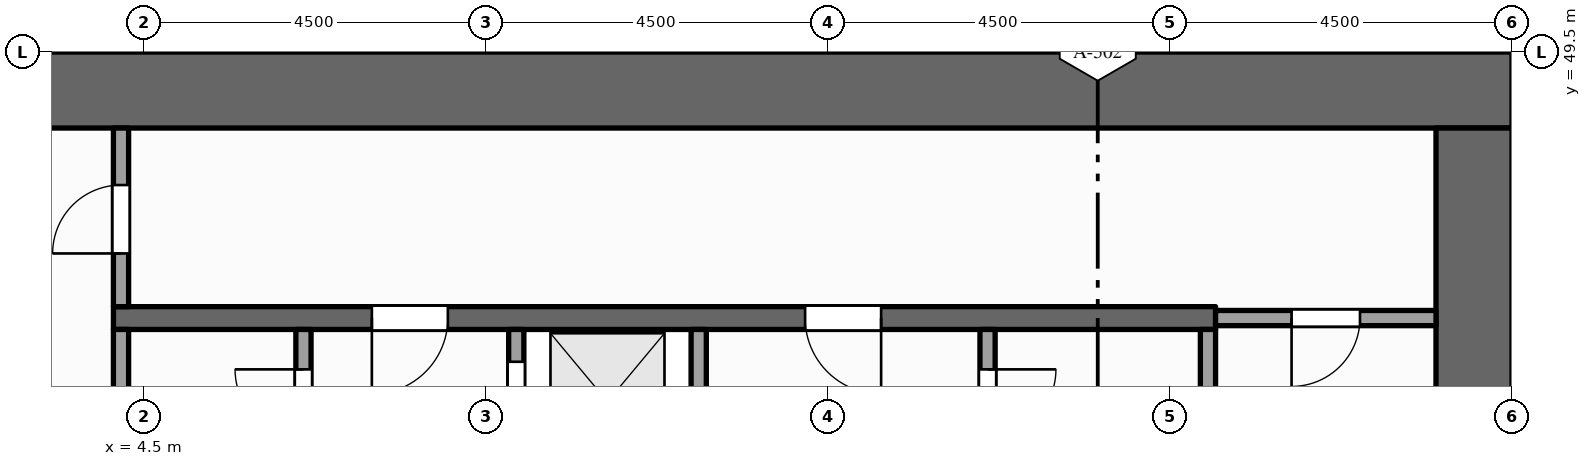
"""IFC4 building model, lengths in metres.
Left out: names, types, materials, properties, quantities, classifications, styles, units other than length and angle.
Written with IfcOpenShell. Run it as: python <this file> out.ifc"""

import sys

from ifc_helpers import new_model, si_unit, direction, frame, frame_2d, origin, place, context, subcontext, project, spatial, rectangle, extrude, element, fill, save


model = new_model("IFC4")
c1 = context("Model", 3, precision=1e-05, world=origin(), true_north=direction((0.0, 1.0)))
c2 = subcontext(c1, "Body", "Model", "MODEL_VIEW")
j1 = project(units=[si_unit("LENGTHUNIT", "METRE"), si_unit("PLANEANGLEUNIT", "RADIAN")], contexts=[c1])
p1 = place(None, origin())
s1 = spatial("IfcSite", under=j1, at=p1, CompositionType="ELEMENT")
p2 = place(p1, origin())
s2 = spatial("IfcBuilding", under=s1, at=p2, CompositionType="ELEMENT")
p3 = place(p2, frame((0.0, 0.0, 235.0)))
s3 = spatial("IfcBuildingStorey", under=s2, at=p3, CompositionType="ELEMENT", Elevation=235.0)
p4 = place(p3, frame((0.0, 49.0, -0.15), z_axis=(0.0, 0.0, 1.0), x_axis=(1.0, 0.0, 0.0)))
e1 = element("IfcWall", 1, at=p4, inside=s3, PredefinedType="SHEAR", context=c2, shape_type="SweptSolid", body=[
    extrude(rectangle(XDim=22.5, YDim=1.0, at=frame_2d((11.25, 0.0))), origin(), (0.0, 0.0, 1.0), 4.0),
])
p5 = place(p3, frame((22.0, 37.0, -0.15), z_axis=(0.0, 0.0, 1.0), x_axis=(0.0, 1.0, 0.0)))
e2 = element("IfcWall", 2, at=p5, inside=s3, PredefinedType="SHEAR", context=c2, shape_type="SweptSolid", body=[
    extrude(rectangle(XDim=11.5, YDim=1.0, at=frame_2d((5.75, 0.0))), origin(), (0.0, 0.0, 1.0), 4.0),
])
p6 = place(p3, frame((4.2, 43.525, 0.0), z_axis=(0.0, 0.0, 1.0), x_axis=(0.0, 1.0, 0.0)))
e3 = element("IfcWall", 3, at=p6, inside=s3, PredefinedType="PARTITIONING", context=c2, shape_type="SweptSolid", body=[
    extrude(rectangle(XDim=2.325, YDim=0.2, at=frame_2d((1.163, 0.0))), origin(), (0.0, 0.0, 1.0), 3.85),
])
p7 = place(p3, frame((4.2, 46.15, 0.0), z_axis=(0.0, 0.0, 1.0), x_axis=(0.0, 1.0, 0.0)))
e4 = element("IfcWall", 4, at=p7, inside=s3, PredefinedType="PARTITIONING", context=c2, shape_type="SweptSolid", body=[
    extrude(rectangle(XDim=2.35, YDim=0.2, at=frame_2d((1.175, 0.0))), origin(), (0.0, 0.0, 1.0), 3.85),
])
p8 = place(p7, frame((0.7, 0.0, 0.0)))
e5 = element("IfcOpeningElement", 5, at=p8, cuts=e4, PredefinedType="OPENING", context=c2, shape_type="SweptSolid", body=[
    extrude(rectangle(XDim=0.9, YDim=2.1, at=frame_2d((0.45, 1.05))), frame((0.0, 0.11, 0.0), z_axis=(0.0, -1.0, 0.0), x_axis=(1.0, 0.0, 0.0)), (0.0, 0.0, 1.0), 0.22),
])
p9 = place(p3, frame((6.6, 37.0, 0.0), z_axis=(0.0, 0.0, 1.0), x_axis=(0.0, 1.0, 0.0)))
e6 = element("IfcWall", 6, at=p9, inside=s3, PredefinedType="PARTITIONING", context=c2, shape_type="SweptSolid", body=[
    extrude(rectangle(XDim=8.85, YDim=0.2, at=frame_2d((4.425, 0.0))), origin(), (0.0, 0.0, 1.0), 3.85),
])
p10 = place(p9, frame((2.9, 0.0, 0.0)))
e7 = element("IfcOpeningElement", 7, at=p10, cuts=e6, PredefinedType="OPENING", context=c2, shape_type="SweptSolid", body=[
    extrude(rectangle(XDim=0.9, YDim=2.1, at=frame_2d((0.45, 1.05))), frame((0.0, 0.11, 0.0), z_axis=(0.0, -1.0, 0.0), x_axis=(1.0, 0.0, 0.0)), (0.0, 0.0, 1.0), 0.22),
])
p11 = place(p9, frame((7.425, 0.0, 0.0)))
e8 = element("IfcOpeningElement", 8, at=p11, cuts=e6, PredefinedType="OPENING", context=c2, shape_type="SweptSolid", body=[
    extrude(rectangle(XDim=0.9, YDim=2.1, at=frame_2d((0.45, 1.05))), frame((0.0, 0.11, 0.0), z_axis=(0.0, -1.0, 0.0), x_axis=(1.0, 0.0, 0.0)), (0.0, 0.0, 1.0), 0.22),
])
p12 = place(p3, frame((9.4, 37.0, 0.0), z_axis=(0.0, 0.0, 1.0), x_axis=(0.0, 1.0, 0.0)))
e9 = element("IfcWall", 9, at=p12, inside=s3, PredefinedType="SOLIDWALL", context=c2, shape_type="SweptSolid", body=[
    extrude(rectangle(XDim=8.85, YDim=0.2, at=frame_2d((4.425, 0.0))), origin(), (0.0, 0.0, 1.0), 3.85),
])
p13 = place(p12, frame((0.6, 0.0, 0.012)))
e10 = element("IfcOpeningElement", 10, at=p13, cuts=e9, PredefinedType="OPENING", context=c2, shape_type="SweptSolid", body=[
    extrude(rectangle(XDim=1.1, YDim=2.1, at=frame_2d((0.55, 1.05))), frame((0.0, 0.11, 0.0), z_axis=(0.0, -1.0, 0.0), x_axis=(1.0, 0.0, 0.0)), (0.0, 0.0, 1.0), 0.22),
])
p14 = place(p12, frame((2.95, 0.0, 0.012)))
e11 = element("IfcOpeningElement", 11, at=p14, cuts=e9, PredefinedType="OPENING", context=c2, shape_type="SweptSolid", body=[
    extrude(rectangle(XDim=1.1, YDim=2.1, at=frame_2d((0.55, 1.05))), frame((0.0, 0.11, 0.0), z_axis=(0.0, -1.0, 0.0), x_axis=(1.0, 0.0, 0.0)), (0.0, 0.0, 1.0), 0.22),
])
p15 = place(p12, frame((5.15, 0.0, 0.012)))
e12 = element("IfcOpeningElement", 12, at=p15, cuts=e9, PredefinedType="OPENING", context=c2, shape_type="SweptSolid", body=[
    extrude(rectangle(XDim=1.1, YDim=2.1, at=frame_2d((0.55, 1.05))), frame((0.0, 0.11, 0.0), z_axis=(0.0, -1.0, 0.0), x_axis=(1.0, 0.0, 0.0)), (0.0, 0.0, 1.0), 0.22),
])
p16 = place(p12, frame((7.325, 0.0, 0.012)))
e13 = element("IfcOpeningElement", 13, at=p16, cuts=e9, PredefinedType="OPENING", context=c2, shape_type="SweptSolid", body=[
    extrude(rectangle(XDim=1.1, YDim=2.1, at=frame_2d((0.55, 1.05))), frame((0.0, 0.11, 0.0), z_axis=(0.0, -1.0, 0.0), x_axis=(1.0, 0.0, 0.0)), (0.0, 0.0, 1.0), 0.22),
])
p17 = place(p3, frame((11.8, 37.0, 0.0), z_axis=(0.0, 0.0, 1.0), x_axis=(0.0, 1.0, 0.0)))
e14 = element("IfcWall", 14, at=p17, inside=s3, PredefinedType="SOLIDWALL", context=c2, shape_type="SweptSolid", body=[
    extrude(rectangle(XDim=8.85, YDim=0.2, at=frame_2d((4.425, 0.0))), origin(), (0.0, 0.0, 1.0), 3.85),
])
p18 = place(p3, frame((15.6, 43.9, 0.0), z_axis=(0.0, 0.0, 1.0), x_axis=(0.0, 1.0, 0.0)))
e15 = element("IfcWall", 15, at=p18, inside=s3, PredefinedType="PARTITIONING", context=c2, shape_type="SweptSolid", body=[
    extrude(rectangle(XDim=1.95, YDim=0.2, at=frame_2d((0.975, 0.0))), origin(), (0.0, 0.0, 1.0), 3.85),
])
p19 = place(p18, frame((0.525, 0.0, 0.0)))
e16 = element("IfcOpeningElement", 16, at=p19, cuts=e15, PredefinedType="OPENING", context=c2, shape_type="SweptSolid", body=[
    extrude(rectangle(XDim=0.9, YDim=2.1, at=frame_2d((0.45, 1.05))), frame((0.0, 0.11, 0.0), z_axis=(0.0, -1.0, 0.0), x_axis=(1.0, 0.0, 0.0)), (0.0, 0.0, 1.0), 0.22),
])
p20 = place(p3, frame((18.5, 43.9, 0.0), z_axis=(0.0, 0.0, 1.0), x_axis=(0.0, 1.0, 0.0)))
e17 = element("IfcWall", 17, at=p20, inside=s3, PredefinedType="PARTITIONING", context=c2, shape_type="SweptSolid", body=[
    extrude(rectangle(XDim=1.95, YDim=0.2, at=frame_2d((0.975, 0.0))), origin(), (0.0, 0.0, 1.0), 3.85),
])
p21 = place(p3, frame((4.1, 46.0, 0.0), z_axis=(0.0, 0.0, 1.0), x_axis=(1.0, 0.0, 0.0)))
e18 = element("IfcWall", 18, at=p21, inside=s3, PredefinedType="SHEAR", context=c2, shape_type="SweptSolid", body=[
    extrude(rectangle(XDim=14.5, YDim=0.3, at=frame_2d((7.25, 0.0))), origin(), (0.0, 0.0, 1.0), 3.85),
])
p22 = place(p21, frame((3.4, 0.0, 0.0)))
e19 = element("IfcOpeningElement", 19, at=p22, cuts=e18, PredefinedType="OPENING", context=c2, shape_type="SweptSolid", body=[
    extrude(rectangle(XDim=1.0, YDim=2.1, at=frame_2d((0.5, 1.05))), frame((0.0, 0.16, 0.0), z_axis=(0.0, -1.0, 0.0), x_axis=(1.0, 0.0, 0.0)), (0.0, 0.0, 1.0), 0.32),
])
p23 = place(p21, frame((9.1, 0.0, 0.0)))
e20 = element("IfcOpeningElement", 20, at=p23, cuts=e18, PredefinedType="OPENING", context=c2, shape_type="SweptSolid", body=[
    extrude(rectangle(XDim=1.0, YDim=2.1, at=frame_2d((0.5, 1.05))), frame((0.0, 0.16, 0.0), z_axis=(0.0, -1.0, 0.0), x_axis=(1.0, 0.0, 0.0)), (0.0, 0.0, 1.0), 0.32),
])
p24 = place(p3, frame((18.6, 46.0, 0.0), z_axis=(0.0, 0.0, 1.0), x_axis=(1.0, 0.0, 0.0)))
e21 = element("IfcWall", 21, at=p24, inside=s3, PredefinedType="PARTITIONING", context=c2, shape_type="SweptSolid", body=[
    extrude(rectangle(XDim=2.9, YDim=0.2, at=frame_2d((1.45, 0.0))), origin(), (0.0, 0.0, 1.0), 3.85),
])
p25 = place(p24, frame((1.0, 0.0, 0.0)))
e22 = element("IfcOpeningElement", 22, at=p25, cuts=e21, PredefinedType="OPENING", context=c2, shape_type="SweptSolid", body=[
    extrude(rectangle(XDim=0.9, YDim=2.1, at=frame_2d((0.45, 1.05))), frame((0.0, 0.11, 0.0), z_axis=(0.0, -1.0, 0.0), x_axis=(1.0, 0.0, 0.0)), (0.0, 0.0, 1.0), 0.22),
])
p26 = place(p16, origin())
e23 = element("IfcDoor", 23, at=p26, inside=s3, OperationType="SLIDING_TO_LEFT", PredefinedType="DOOR", context=c2, shape_type="SweptSolid", body=[
    extrude(rectangle(XDim=1.1, YDim=2.1, at=frame_2d((0.55, 1.05))), frame((0.0, 0.025, 0.0), z_axis=(0.0, -1.0, 0.0), x_axis=(1.0, 0.0, 0.0)), (0.0, 0.0, 1.0), 0.05),
])
fill(e13, e23)
p27 = place(p22, origin())
e24 = element("IfcDoor", 24, at=p27, inside=s3, OperationType="SINGLE_SWING_LEFT", PredefinedType="DOOR", context=c2, shape_type="SweptSolid", body=[
    extrude(rectangle(XDim=1.0, YDim=2.1, at=frame_2d((0.5, 1.05))), frame((0.0, 0.025, 0.0), z_axis=(0.0, -1.0, 0.0), x_axis=(1.0, 0.0, 0.0)), (0.0, 0.0, 1.0), 0.05),
])
fill(e19, e24)
p28 = place(p23, origin())
e25 = element("IfcDoor", 25, at=p28, inside=s3, OperationType="SINGLE_SWING_RIGHT", PredefinedType="DOOR", context=c2, shape_type="SweptSolid", body=[
    extrude(rectangle(XDim=1.0, YDim=2.1, at=frame_2d((0.5, 1.05))), frame((0.0, 0.025, 0.0), z_axis=(0.0, -1.0, 0.0), x_axis=(1.0, 0.0, 0.0)), (0.0, 0.0, 1.0), 0.05),
])
fill(e20, e25)
p29 = place(p8, origin())
e26 = element("IfcDoor", 26, at=p29, inside=s3, OperationType="SINGLE_SWING_LEFT", PredefinedType="DOOR", context=c2, shape_type="SweptSolid", body=[
    extrude(rectangle(XDim=0.9, YDim=2.1, at=frame_2d((0.45, 1.05))), frame((0.0, 0.025, 0.0), z_axis=(0.0, -1.0, 0.0), x_axis=(1.0, 0.0, 0.0)), (0.0, 0.0, 1.0), 0.05),
])
fill(e5, e26)
p30 = place(p25, origin())
e27 = element("IfcDoor", 27, at=p30, inside=s3, OperationType="SINGLE_SWING_LEFT", PredefinedType="DOOR", context=c2, shape_type="SweptSolid", body=[
    extrude(rectangle(XDim=0.9, YDim=2.1, at=frame_2d((0.45, 1.05))), frame((0.0, 0.025, 0.0), z_axis=(0.0, -1.0, 0.0), x_axis=(1.0, 0.0, 0.0)), (0.0, 0.0, 1.0), 0.05),
])
fill(e22, e27)
p31 = place(p11, origin())
e28 = element("IfcDoor", 28, at=p31, inside=s3, OperationType="SINGLE_SWING_RIGHT", PredefinedType="DOOR", context=c2, shape_type="SweptSolid", body=[
    extrude(rectangle(XDim=0.9, YDim=2.1, at=frame_2d((0.45, 1.05))), frame((0.0, 0.025, 0.0), z_axis=(0.0, -1.0, 0.0), x_axis=(1.0, 0.0, 0.0)), (0.0, 0.0, 1.0), 0.05),
])
fill(e8, e28)
p32 = place(p19, origin())
e29 = element("IfcDoor", 29, at=p32, inside=s3, OperationType="SINGLE_SWING_RIGHT", PredefinedType="DOOR", context=c2, shape_type="SweptSolid", body=[
    extrude(rectangle(XDim=0.9, YDim=2.1, at=frame_2d((0.45, 1.05))), frame((0.0, 0.025, 0.0), z_axis=(0.0, -1.0, 0.0), x_axis=(1.0, 0.0, 0.0)), (0.0, 0.0, 1.0), 0.05),
])
fill(e16, e29)
save(model, sys.argv[1])
